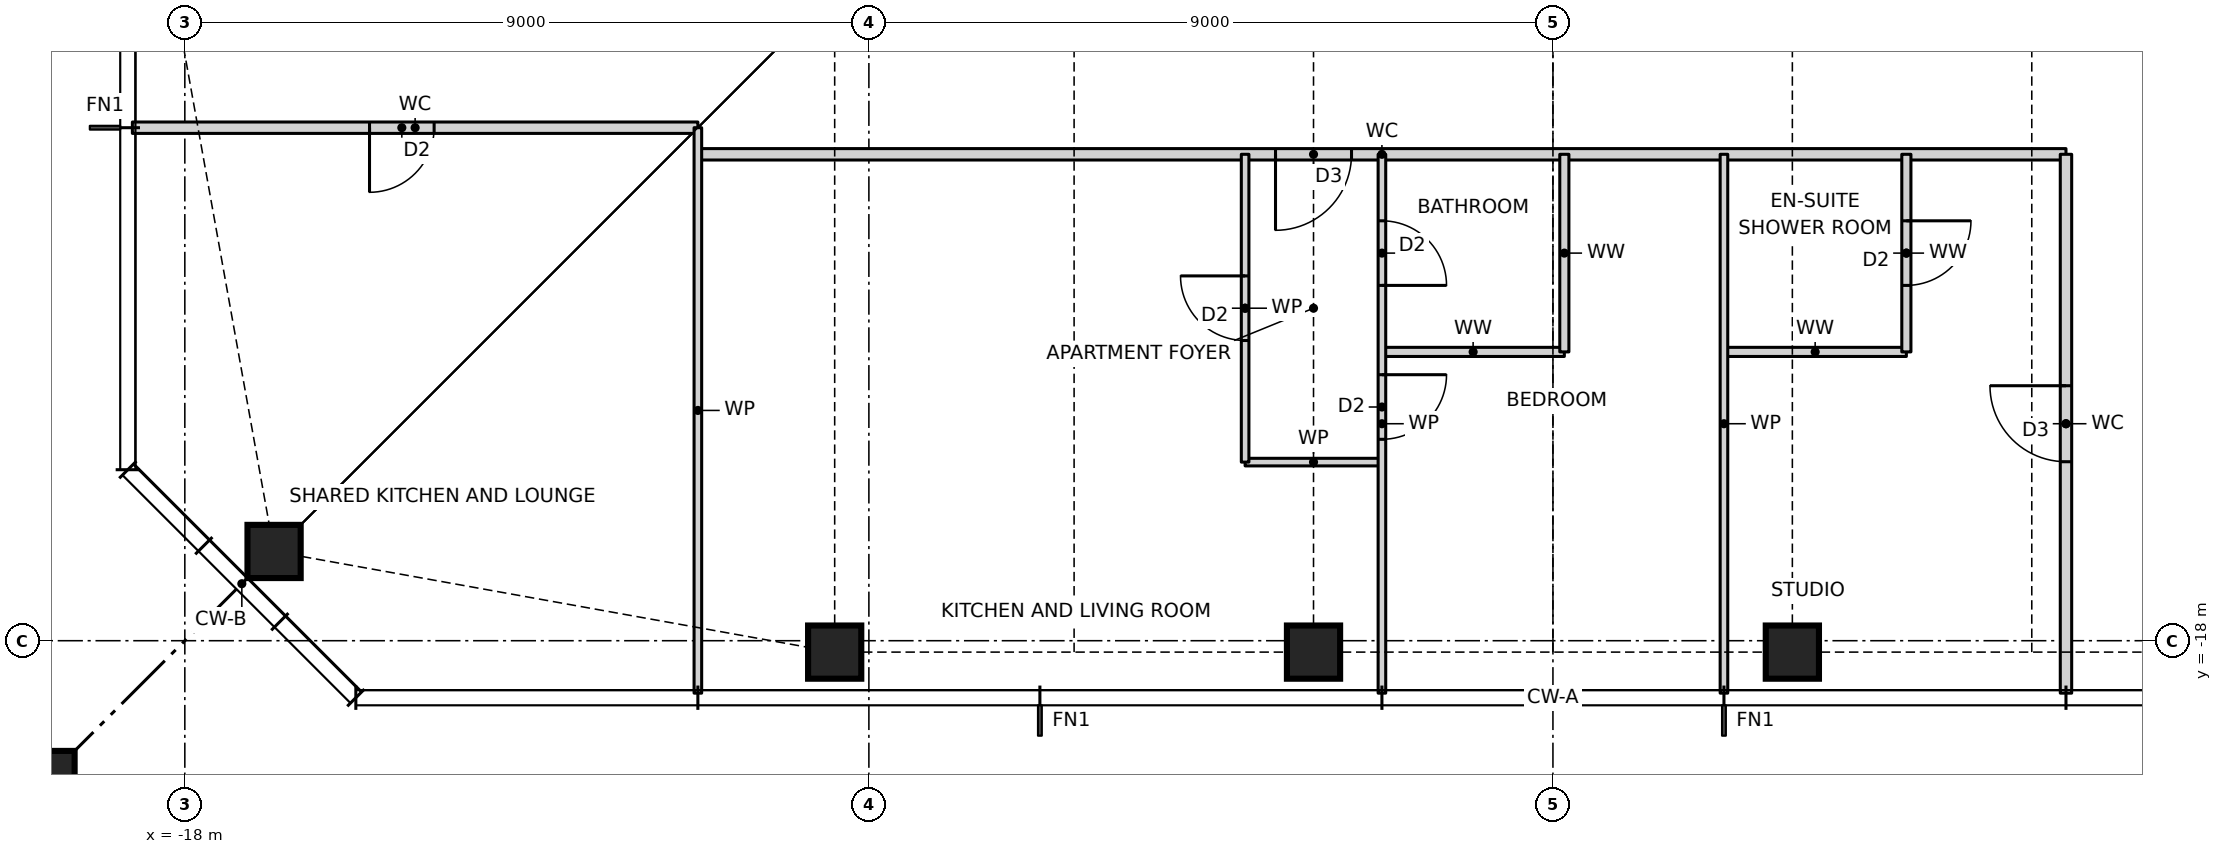
"""IFC4 building model, lengths in metres.
Left out: names, types, materials, properties, quantities, classifications, styles, units other than length and angle.
Written with IfcOpenShell. Run it as: python <this file> out.ifc"""

import sys

from ifc_helpers import new_model, si_unit, direction, frame, frame_2d, origin, origin_2d, place, context, subcontext, project, spatial, rectangle, hollow_rectangle, i_section, extrude, element, fill, save


model = new_model("IFC4")
c1 = context("Model", 3, precision=1e-05, world=origin(), true_north=direction((0.0, 1.0)))
c2 = subcontext(c1, "Body", "Model", "MODEL_VIEW")
j1 = project(units=[si_unit("LENGTHUNIT", "METRE"), si_unit("PLANEANGLEUNIT", "RADIAN")], contexts=[c1])
p1 = place(None, origin())
s1 = spatial("IfcSite", under=j1, at=p1, CompositionType="ELEMENT")
p2 = place(p1, origin())
s2 = spatial("IfcBuilding", under=s1, at=p2, CompositionType="ELEMENT")
p3 = place(p2, frame((0.0, 0.0, 163.5)))
s3 = spatial("IfcBuildingStorey", under=s2, at=p3, CompositionType="ELEMENT", Elevation=163.5)
for number, where, z_axis, x_axis in (
    (1, (-16.826, -16.826, 0.0), (0.0, 0.0, 1.0), (1.0, 0.0, 0.0)),
    (2, (-9.45, -18.15, 0.0), (0.0, 0.0, 1.0), (1.0, 0.0, 0.0)),
    (3, (-3.15, -18.15, 0.0), (0.0, 0.0, 1.0), (1.0, 0.0, 0.0)),
    (4, (3.15, -18.15, 0.0), (0.0, 0.0, 1.0), (1.0, 0.0, 0.0)),
):
    element("IfcColumn", number, at=place(p3, frame(where, z_axis=z_axis, x_axis=x_axis)), inside=s3, PredefinedType="COLUMN", context=c2, shape_type="SweptSolid", body=[
        extrude(hollow_rectangle(XDim=0.7, YDim=0.7, WallThickness=0.06, at=origin_2d()), origin(), (0.0, 0.0, 1.0), 3.5),
    ])
p4 = place(p3, frame((-21.65, -21.65, 0.0), z_axis=(0.0, 0.0, 1.0), x_axis=(1.0, 0.0, 0.0)))
e5 = element("IfcColumn", 5, at=p4, inside=s3, PredefinedType="COLUMN", context=c2, shape_type="SweptSolid", body=[
    extrude(rectangle(XDim=4.4, YDim=4.4, at=origin_2d()), origin(), (0.0, 0.0, 1.0), 3.5),
    extrude(i_section(OverallWidth=0.478, OverallDepth=0.599, WebThickness=0.1, FlangeThickness=0.14, at=origin_2d()), origin(), (0.0, 0.0, 1.0), 3.5),
])
p5 = place(p3, frame((-4.05, -15.65, 0.0), z_axis=(0.0, 0.0, 1.0), x_axis=(1.0, 0.0, 0.0)))
e6 = element("IfcWall", 6, at=p5, inside=s3, PredefinedType="PARTITIONING", context=c2, shape_type="SweptSolid", body=[
    extrude(rectangle(XDim=1.8, YDim=0.1, at=frame_2d((0.9, 0.0))), origin(), (0.0, 0.0, 1.0), 3.27),
])
for number, where, z_axis, x_axis in (
    (7, (-2.25, -14.2, 0.0), (0.0, 0.0, 1.0), (1.0, 0.0, 0.0)),
    (8, (2.25, -14.2, 0.0), (0.0, 0.0, 1.0), (1.0, 0.0, 0.0)),
):
    element("IfcWall", number, at=place(p3, frame(where, z_axis=z_axis, x_axis=x_axis)), inside=s3, PredefinedType="PARTITIONING", context=c2, shape_type="SweptSolid", body=[
        extrude(rectangle(XDim=2.4, YDim=0.12, at=frame_2d((1.2, 0.0))), origin(), (0.0, 0.0, 1.0), 3.27),
    ])
p6 = place(p3, frame((-11.25, -11.6, 0.0), z_axis=(0.0, 0.0, 1.0), x_axis=(1.0, 0.0, 0.0)))
e9 = element("IfcWall", 9, at=p6, inside=s3, PredefinedType="PARTITIONING", context=c2, shape_type="SweptSolid", body=[
    extrude(rectangle(XDim=18.0, YDim=0.15, at=frame_2d((9.0, 0.0))), origin(), (0.0, 0.0, 1.0), 3.27),
])
p7 = place(p6, frame((7.6, 0.0, 0.0)))
e10 = element("IfcOpeningElement", 10, at=p7, cuts=e9, PredefinedType="OPENING", context=c2, shape_type="SweptSolid", body=[
    extrude(rectangle(XDim=1.0, YDim=2.1, at=frame_2d((0.5, 1.05))), frame((0.0, 0.085, 0.0), z_axis=(0.0, -1.0, 0.0), x_axis=(1.0, 0.0, 0.0)), (0.0, 0.0, 1.0), 0.17),
])
p8 = place(p3, frame((-18.69, -11.25, 0.0), z_axis=(0.0, 0.0, 1.0), x_axis=(1.0, 0.0, 0.0)))
e11 = element("IfcWall", 11, at=p8, inside=s3, PredefinedType="PARTITIONING", context=c2, shape_type="SweptSolid", body=[
    extrude(rectangle(XDim=7.44, YDim=0.15, at=frame_2d((3.72, 0.0))), origin(), (0.0, 0.0, 1.0), 3.27),
])
p9 = place(p8, frame((3.12, 0.0, 0.0)))
e12 = element("IfcOpeningElement", 12, at=p9, cuts=e11, PredefinedType="OPENING", context=c2, shape_type="SweptSolid", body=[
    extrude(rectangle(XDim=0.85, YDim=2.1, at=frame_2d((0.425, 1.05))), frame((0.0, 0.085, 0.0), z_axis=(0.0, -1.0, 0.0), x_axis=(1.0, 0.0, 0.0)), (0.0, 0.0, 1.0), 0.17),
])
p10 = place(p3, frame((6.75, -18.69, 0.0), z_axis=(0.0, 0.0, 1.0), x_axis=(0.0, 1.0, 0.0)))
e13 = element("IfcWall", 13, at=p10, inside=s3, PredefinedType="PARTITIONING", context=c2, shape_type="SweptSolid", body=[
    extrude(rectangle(XDim=7.09, YDim=0.15, at=frame_2d((3.545, 0.0))), origin(), (0.0, 0.0, 1.0), 3.27),
])
p11 = place(p10, frame((3.045, 0.0, 0.0)))
e14 = element("IfcOpeningElement", 14, at=p11, cuts=e13, PredefinedType="OPENING", context=c2, shape_type="SweptSolid", body=[
    extrude(rectangle(XDim=1.0, YDim=2.1, at=frame_2d((0.5, 1.05))), frame((0.0, 0.085, 0.0), z_axis=(0.0, -1.0, 0.0), x_axis=(1.0, 0.0, 0.0)), (0.0, 0.0, 1.0), 0.17),
])
p12 = place(p3, frame((4.65, -14.2, 0.0), z_axis=(0.0, 0.0, 1.0), x_axis=(0.0, 1.0, 0.0)))
e15 = element("IfcWall", 15, at=p12, inside=s3, PredefinedType="PARTITIONING", context=c2, shape_type="SweptSolid", body=[
    extrude(rectangle(XDim=2.6, YDim=0.12, at=frame_2d((1.3, 0.0))), origin(), (0.0, 0.0, 1.0), 3.27),
])
p13 = place(p12, frame((0.875, 0.0, 0.0)))
e16 = element("IfcOpeningElement", 16, at=p13, cuts=e15, PredefinedType="OPENING", context=c2, shape_type="SweptSolid", body=[
    extrude(rectangle(XDim=0.85, YDim=2.1, at=frame_2d((0.425, 1.05))), frame((0.0, 0.07, 0.0), z_axis=(0.0, -1.0, 0.0), x_axis=(1.0, 0.0, 0.0)), (0.0, 0.0, 1.0), 0.14),
])
p14 = place(p3, frame((2.25, -18.69, 0.0), z_axis=(0.0, 0.0, 1.0), x_axis=(0.0, 1.0, 0.0)))
e17 = element("IfcWall", 17, at=p14, inside=s3, PredefinedType="PARTITIONING", context=c2, shape_type="SweptSolid", body=[
    extrude(rectangle(XDim=7.09, YDim=0.1, at=frame_2d((3.545, 0.0))), origin(), (0.0, 0.0, 1.0), 3.27),
])
p15 = place(p3, frame((0.15, -14.2, 0.0), z_axis=(0.0, 0.0, 1.0), x_axis=(0.0, 1.0, 0.0)))
e18 = element("IfcWall", 18, at=p15, inside=s3, PredefinedType="PARTITIONING", context=c2, shape_type="SweptSolid", body=[
    extrude(rectangle(XDim=2.6, YDim=0.12, at=frame_2d((1.3, 0.0))), origin(), (0.0, 0.0, 1.0), 3.27),
])
p16 = place(p3, frame((-2.25, -18.69, 0.0), z_axis=(0.0, 0.0, 1.0), x_axis=(0.0, 1.0, 0.0)))
e19 = element("IfcWall", 19, at=p16, inside=s3, PredefinedType="PARTITIONING", context=c2, shape_type="SweptSolid", body=[
    extrude(rectangle(XDim=7.09, YDim=0.1, at=frame_2d((3.545, 0.0))), origin(), (0.0, 0.0, 1.0), 3.27),
])
p17 = place(p16, frame((3.34, 0.0, 0.0)))
e20 = element("IfcOpeningElement", 20, at=p17, cuts=e19, PredefinedType="OPENING", context=c2, shape_type="SweptSolid", body=[
    extrude(rectangle(XDim=0.85, YDim=2.1, at=frame_2d((0.425, 1.05))), frame((0.0, 0.06, 0.0), z_axis=(0.0, -1.0, 0.0), x_axis=(1.0, 0.0, 0.0)), (0.0, 0.0, 1.0), 0.12),
])
p18 = place(p16, frame((5.365, 0.0, 0.0)))
e21 = element("IfcOpeningElement", 21, at=p18, cuts=e19, PredefinedType="OPENING", context=c2, shape_type="SweptSolid", body=[
    extrude(rectangle(XDim=0.85, YDim=2.1, at=frame_2d((0.425, 1.05))), frame((0.0, 0.06, 0.0), z_axis=(0.0, -1.0, 0.0), x_axis=(1.0, 0.0, 0.0)), (0.0, 0.0, 1.0), 0.12),
])
p19 = place(p3, frame((-4.05, -15.65, 0.0), z_axis=(0.0, 0.0, 1.0), x_axis=(0.0, 1.0, 0.0)))
e22 = element("IfcWall", 22, at=p19, inside=s3, PredefinedType="PARTITIONING", context=c2, shape_type="SweptSolid", body=[
    extrude(rectangle(XDim=4.05, YDim=0.1, at=frame_2d((2.025, 0.0))), origin(), (0.0, 0.0, 1.0), 3.27),
])
p20 = place(p19, frame((1.6, 0.0, 0.0)))
e23 = element("IfcOpeningElement", 23, at=p20, cuts=e22, PredefinedType="OPENING", context=c2, shape_type="SweptSolid", body=[
    extrude(rectangle(XDim=0.85, YDim=2.1, at=frame_2d((0.425, 1.05))), frame((0.0, 0.06, 0.0), z_axis=(0.0, -1.0, 0.0), x_axis=(1.0, 0.0, 0.0)), (0.0, 0.0, 1.0), 0.12),
])
p21 = place(p3, frame((-11.25, -18.69, 0.0), z_axis=(0.0, 0.0, 1.0), x_axis=(0.0, 1.0, 0.0)))
e24 = element("IfcWall", 24, at=p21, inside=s3, PredefinedType="PARTITIONING", context=c2, shape_type="SweptSolid", body=[
    extrude(rectangle(XDim=7.44, YDim=0.1, at=frame_2d((3.72, 0.0))), origin(), (0.0, 0.0, 1.0), 3.27),
])
p22 = place(p7, frame((1.0, 0.0, 0.0), z_axis=(0.0, 0.0, 1.0), x_axis=(-1.0, 0.0, 0.0)))
e25 = element("IfcDoor", 25, at=p22, inside=s3, OperationType="SINGLE_SWING_RIGHT", PredefinedType="DOOR", context=c2, shape_type="SweptSolid", body=[
    extrude(rectangle(XDim=1.0, YDim=2.1, at=frame_2d((0.5, 1.05))), frame((0.0, 0.025, 0.0), z_axis=(0.0, -1.0, 0.0), x_axis=(1.0, 0.0, 0.0)), (0.0, 0.0, 1.0), 0.05),
])
fill(e10, e25)
p23 = place(p20, origin())
e26 = element("IfcDoor", 26, at=p23, inside=s3, OperationType="SINGLE_SWING_RIGHT", PredefinedType="DOOR", context=c2, shape_type="SweptSolid", body=[
    extrude(rectangle(XDim=0.85, YDim=2.1, at=frame_2d((0.425, 1.05))), frame((0.0, 0.025, 0.0), z_axis=(0.0, -1.0, 0.0), x_axis=(1.0, 0.0, 0.0)), (0.0, 0.0, 1.0), 0.05),
])
fill(e23, e26)
p24 = place(p17, frame((0.85, 0.0, 0.0), z_axis=(0.0, 0.0, 1.0), x_axis=(-1.0, 0.0, 0.0)))
e27 = element("IfcDoor", 27, at=p24, inside=s3, OperationType="SINGLE_SWING_LEFT", PredefinedType="DOOR", context=c2, shape_type="SweptSolid", body=[
    extrude(rectangle(XDim=0.85, YDim=2.1, at=frame_2d((0.425, 1.05))), frame((0.0, 0.025, 0.0), z_axis=(0.0, -1.0, 0.0), x_axis=(1.0, 0.0, 0.0)), (0.0, 0.0, 1.0), 0.05),
])
fill(e20, e27)
p25 = place(p18, frame((0.85, 0.0, 0.0), z_axis=(0.0, 0.0, 1.0), x_axis=(-1.0, 0.0, 0.0)))
e28 = element("IfcDoor", 28, at=p25, inside=s3, OperationType="SINGLE_SWING_RIGHT", PredefinedType="DOOR", context=c2, shape_type="SweptSolid", body=[
    extrude(rectangle(XDim=0.85, YDim=2.1, at=frame_2d((0.425, 1.05))), frame((0.0, 0.025, 0.0), z_axis=(0.0, -1.0, 0.0), x_axis=(1.0, 0.0, 0.0)), (0.0, 0.0, 1.0), 0.05),
])
fill(e21, e28)
p26 = place(p11, origin())
e29 = element("IfcDoor", 29, at=p26, inside=s3, OperationType="SINGLE_SWING_RIGHT", PredefinedType="DOOR", context=c2, shape_type="SweptSolid", body=[
    extrude(rectangle(XDim=1.0, YDim=2.1, at=frame_2d((0.5, 1.05))), frame((0.0, 0.025, 0.0), z_axis=(0.0, -1.0, 0.0), x_axis=(1.0, 0.0, 0.0)), (0.0, 0.0, 1.0), 0.05),
])
fill(e14, e29)
p27 = place(p13, frame((0.85, 0.0, 0.0), z_axis=(0.0, 0.0, 1.0), x_axis=(-1.0, 0.0, 0.0)))
e30 = element("IfcDoor", 30, at=p27, inside=s3, OperationType="SINGLE_SWING_LEFT", PredefinedType="DOOR", context=c2, shape_type="SweptSolid", body=[
    extrude(rectangle(XDim=0.85, YDim=2.1, at=frame_2d((0.425, 1.05))), frame((0.0, 0.025, 0.0), z_axis=(0.0, -1.0, 0.0), x_axis=(1.0, 0.0, 0.0)), (0.0, 0.0, 1.0), 0.05),
])
fill(e16, e30)
p28 = place(p9, frame((0.85, 0.0, 0.0), z_axis=(0.0, 0.0, 1.0), x_axis=(-1.0, 0.0, 0.0)))
e31 = element("IfcDoor", 31, at=p28, inside=s3, OperationType="SINGLE_SWING_RIGHT", PredefinedType="DOOR", context=c2, shape_type="SweptSolid", body=[
    extrude(rectangle(XDim=0.85, YDim=2.1, at=frame_2d((0.425, 1.05))), frame((0.0, 0.025, 0.0), z_axis=(0.0, -1.0, 0.0), x_axis=(1.0, 0.0, 0.0)), (0.0, 0.0, 1.0), 0.05),
])
fill(e12, e31)
save(model, sys.argv[1])
